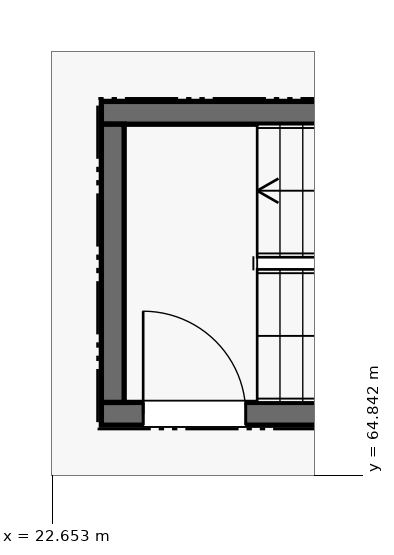
"""IFC4 building model, lengths in metres.
Left out: names, types, materials, properties, quantities, classifications, styles, units other than length and angle.
Written with IfcOpenShell. Run it as: python <this file> out.ifc"""

import sys

from ifc_helpers import new_model, si_unit, direction, frame, frame_2d, origin, place, context, subcontext, project, spatial, rectangle, extrude, element, fill, save


model = new_model("IFC4")
c1 = context("Model", 3, precision=1e-05, world=origin(), true_north=direction((0.0, 1.0)))
c2 = subcontext(c1, "Body", "Model", "MODEL_VIEW")
j1 = project(units=[si_unit("LENGTHUNIT", "METRE"), si_unit("PLANEANGLEUNIT", "RADIAN")], contexts=[c1])
p1 = place(None, origin())
s1 = spatial("IfcSite", under=j1, at=p1, CompositionType="ELEMENT")
p2 = place(p1, origin())
s2 = spatial("IfcBuilding", under=s1, at=p2, CompositionType="ELEMENT")
p3 = place(p2, frame((0.0, 0.0, 5.4)))
s3 = spatial("IfcBuildingStorey", under=s2, at=p3, CompositionType="ELEMENT", Elevation=5.4)
p4 = place(p3, frame((23.3, 65.65, 0.0), z_axis=(0.0, 0.0, 1.0), x_axis=(1.0, 0.0, 0.0)))
e1 = element("IfcWall", 1, at=p4, inside=s3, PredefinedType="SHEAR", context=c2, shape_type="SweptSolid", body=[
    extrude(rectangle(XDim=8.65, YDim=0.3, at=frame_2d((4.325, 0.0))), origin(), (0.0, 0.0, 1.0), 4.28),
])
p5 = place(p4, frame((0.55, 0.0, 0.0)))
e2 = element("IfcOpeningElement", 2, at=p5, cuts=e1, PredefinedType="OPENING", context=c2, shape_type="SweptSolid", body=[
    extrude(rectangle(XDim=1.35, YDim=2.2, at=frame_2d((0.675, 1.1))), frame((0.0, 0.16, 0.0), z_axis=(0.0, -1.0, 0.0), x_axis=(1.0, 0.0, 0.0)), (0.0, 0.0, 1.0), 0.32),
])
p6 = place(p3, frame((31.95, 69.61, 0.0), z_axis=(0.0, 0.0, 1.0), x_axis=(-1.0, 0.0, 0.0)))
e3 = element("IfcWall", 3, at=p6, inside=s3, PredefinedType="SHEAR", context=c2, shape_type="SweptSolid", body=[
    extrude(rectangle(XDim=8.65, YDim=0.3, at=frame_2d((4.325, 0.0))), origin(), (0.0, 0.0, 1.0), 4.28),
])
p7 = place(p3, frame((23.45, 69.46, 0.0), z_axis=(0.0, 0.0, 1.0), x_axis=(0.0, -1.0, 0.0)))
e4 = element("IfcWall", 4, at=p7, inside=s3, PredefinedType="SHEAR", context=c2, shape_type="SweptSolid", body=[
    extrude(rectangle(XDim=3.66, YDim=0.3, at=frame_2d((1.83, 0.0))), origin(), (0.0, 0.0, 1.0), 4.28),
])
p8 = place(p5, origin())
e5 = element("IfcDoor", 5, at=p8, inside=s3, OperationType="SINGLE_SWING_LEFT", PredefinedType="DOOR", context=c2, shape_type="SweptSolid", body=[
    extrude(rectangle(XDim=1.35, YDim=2.2, at=frame_2d((0.675, 1.1))), frame((0.0, 0.025, 0.0), z_axis=(0.0, -1.0, 0.0), x_axis=(1.0, 0.0, 0.0)), (0.0, 0.0, 1.0), 0.05),
])
fill(e2, e5)
save(model, sys.argv[1])
